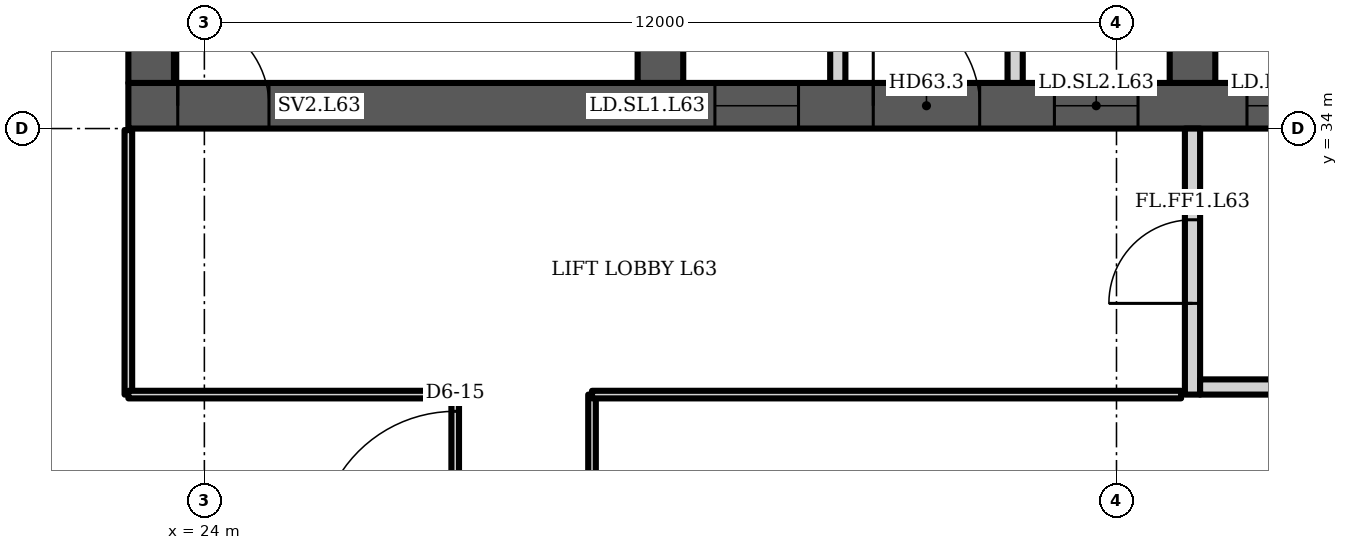
"""IFC4 building model, lengths in metres.
Left out: names, types, materials, properties, quantities, classifications, styles, units other than length and angle.
Written with IfcOpenShell. Run it as: python <this file> out.ifc"""

import sys

from ifc_helpers import new_model, si_unit, direction, frame, frame_2d, origin, place, context, subcontext, project, spatial, polyline, rectangle, outline, extrude, element, fill, save


model = new_model("IFC4")
c1 = context("Model", 3, precision=1e-05, world=origin(), true_north=direction((0.0, 1.0)))
c2 = subcontext(c1, "Body", "Model", "MODEL_VIEW")
j1 = project(units=[si_unit("LENGTHUNIT", "METRE"), si_unit("PLANEANGLEUNIT", "RADIAN")], contexts=[c1])
p1 = place(None, origin())
s1 = spatial("IfcSite", under=j1, at=p1, CompositionType="ELEMENT")
p2 = place(p1, origin())
s2 = spatial("IfcBuilding", under=s1, at=p2, CompositionType="ELEMENT")
p3 = place(p2, frame((0.0, 0.0, 250.3)))
s3 = spatial("IfcBuildingStorey", under=s2, at=p3, CompositionType="ELEMENT", Elevation=250.3)
p4 = place(p3, frame((23.0, 34.3, 0.0), z_axis=(0.0, 0.0, 1.0), x_axis=(1.0, 0.0, 0.0)))
e1 = element("IfcWall", 1, at=p4, inside=s3, PredefinedType="SHEAR", context=c2, shape_type="SweptSolid", body=[
    extrude(rectangle(XDim=35.0, YDim=0.6, at=frame_2d((17.5, 0.0))), origin(), (0.0, 0.0, 1.0), 3.6),
])
p5 = place(p4, frame((0.65, 0.0, 0.0)))
e2 = element("IfcOpeningElement", 2, at=p5, cuts=e1, PredefinedType="OPENING", context=c2, shape_type="SweptSolid", body=[
    extrude(rectangle(XDim=1.2, YDim=2.1, at=frame_2d((0.6, 1.05))), frame((0.0, 0.31, 0.0), z_axis=(0.0, -1.0, 0.0), x_axis=(1.0, 0.0, 0.0)), (0.0, 0.0, 1.0), 0.62),
])
p6 = place(p4, frame((7.717, 0.0, 0.0)))
e3 = element("IfcOpeningElement", 3, at=p6, cuts=e1, PredefinedType="OPENING", context=c2, shape_type="SweptSolid", body=[
    extrude(rectangle(XDim=1.1, YDim=2.1, at=frame_2d((0.55, 1.05))), frame((0.0, 0.31, 0.0), z_axis=(0.0, -1.0, 0.0), x_axis=(1.0, 0.0, 0.0)), (0.0, 0.0, 1.0), 0.62),
])
p7 = place(p4, frame((12.183, 0.0, 0.0)))
e4 = element("IfcOpeningElement", 4, at=p7, cuts=e1, PredefinedType="OPENING", context=c2, shape_type="SweptSolid", body=[
    extrude(rectangle(XDim=1.1, YDim=2.1, at=frame_2d((0.55, 1.05))), frame((0.0, 0.31, 0.0), z_axis=(0.0, -1.0, 0.0), x_axis=(1.0, 0.0, 0.0)), (0.0, 0.0, 1.0), 0.62),
])
p8 = place(p4, frame((9.8, 0.0, 0.0)))
e5 = element("IfcOpeningElement", 5, at=p8, cuts=e1, PredefinedType="OPENING", context=c2, shape_type="SweptSolid", body=[
    extrude(rectangle(XDim=1.4, YDim=2.1, at=frame_2d((0.7, 1.05))), frame((0.0, 0.31, 0.0), z_axis=(0.0, -1.0, 0.0), x_axis=(1.0, 0.0, 0.0)), (0.0, 0.0, 1.0), 0.62),
])
p9 = place(p4, frame((14.717, 0.0, 0.0)))
e6 = element("IfcOpeningElement", 6, at=p9, cuts=e1, PredefinedType="OPENING", context=c2, shape_type="SweptSolid", body=[
    extrude(rectangle(XDim=1.1, YDim=2.1, at=frame_2d((0.55, 1.05))), frame((0.0, 0.31, 0.0), z_axis=(0.0, -1.0, 0.0), x_axis=(1.0, 0.0, 0.0)), (0.0, 0.0, 1.0), 0.62),
])
p10 = place(p4, frame((16.95, 0.0, 0.0)))
e7 = element("IfcOpeningElement", 7, at=p10, cuts=e1, PredefinedType="OPENING", context=c2, shape_type="SweptSolid", body=[
    extrude(rectangle(XDim=1.1, YDim=2.1, at=frame_2d((0.55, 1.05))), frame((0.0, 0.31, 0.0), z_axis=(0.0, -1.0, 0.0), x_axis=(1.0, 0.0, 0.0)), (0.0, 0.0, 1.0), 0.62),
])
p11 = place(p4, frame((19.183, 0.0, 0.0)))
e8 = element("IfcOpeningElement", 8, at=p11, cuts=e1, PredefinedType="OPENING", context=c2, shape_type="SweptSolid", body=[
    extrude(rectangle(XDim=1.1, YDim=2.1, at=frame_2d((0.55, 1.05))), frame((0.0, 0.31, 0.0), z_axis=(0.0, -1.0, 0.0), x_axis=(1.0, 0.0, 0.0)), (0.0, 0.0, 1.0), 0.62),
])
p12 = place(p4, frame((26.15, 0.0, 0.0)))
e9 = element("IfcOpeningElement", 9, at=p12, cuts=e1, PredefinedType="OPENING", context=c2, shape_type="SweptSolid", body=[
    extrude(rectangle(XDim=1.2, YDim=2.1, at=frame_2d((0.6, 1.05))), frame((0.0, 0.31, 0.0), z_axis=(0.0, -1.0, 0.0), x_axis=(1.0, 0.0, 0.0)), (0.0, 0.0, 1.0), 0.62),
])
p13 = place(p4, frame((28.767, 0.0, 0.0)))
e10 = element("IfcOpeningElement", 10, at=p13, cuts=e1, PredefinedType="OPENING", context=c2, shape_type="SweptSolid", body=[
    extrude(rectangle(XDim=1.0, YDim=2.1, at=frame_2d((0.5, 1.05))), frame((0.0, 0.31, 0.0), z_axis=(0.0, -1.0, 0.0), x_axis=(1.0, 0.0, 0.0)), (0.0, 0.0, 1.0), 0.62),
])
p14 = place(p4, frame((33.083, 0.0, 0.0)))
e11 = element("IfcOpeningElement", 11, at=p14, cuts=e1, PredefinedType="OPENING", context=c2, shape_type="SweptSolid", body=[
    extrude(rectangle(XDim=1.0, YDim=2.1, at=frame_2d((0.5, 1.05))), frame((0.0, 0.31, 0.0), z_axis=(0.0, -1.0, 0.0), x_axis=(1.0, 0.0, 0.0)), (0.0, 0.0, 1.0), 0.62),
])
p15 = place(p4, frame((30.8, 0.0, 0.0)))
e12 = element("IfcOpeningElement", 12, at=p15, cuts=e1, PredefinedType="OPENING", context=c2, shape_type="SweptSolid", body=[
    extrude(rectangle(XDim=1.4, YDim=2.1, at=frame_2d((0.7, 1.05))), frame((0.0, 0.31, 0.0), z_axis=(0.0, -1.0, 0.0), x_axis=(1.0, 0.0, 0.0)), (0.0, 0.0, 1.0), 0.62),
])
p16 = place(p3, frame((23.3, 34.6, 0.0), z_axis=(0.0, 0.0, 1.0), x_axis=(0.0, 1.0, 0.0)))
e13 = element("IfcWall", 13, at=p16, inside=s3, PredefinedType="SHEAR", context=c2, shape_type="SweptSolid", body=[
    extrude(rectangle(XDim=13.585, YDim=0.6, at=frame_2d((6.792, 0.0))), origin(), (0.0, 0.0, 1.0), 3.6),
])
p17 = place(p3, frame((30.0, 34.6, 0.0), z_axis=(0.0, 0.0, 1.0), x_axis=(0.0, 1.0, 0.0)))
e14 = element("IfcWall", 14, at=p17, inside=s3, PredefinedType="SHEAR", context=c2, shape_type="SweptSolid", body=[
    extrude(rectangle(XDim=14.171, YDim=0.6, at=frame_2d((7.085, 0.0))), origin(), (0.0, 0.0, 1.0), 3.6),
])
p18 = place(p17, frame((3.8, 0.0, 0.0)))
e15 = element("IfcOpeningElement", 15, at=p18, cuts=e14, PredefinedType="OPENING", context=c2, shape_type="SweptSolid", body=[
    extrude(rectangle(XDim=1.1, YDim=2.1, at=frame_2d((0.55, 1.05))), frame((0.0, 0.31, 0.0), z_axis=(0.0, -1.0, 0.0), x_axis=(1.0, 0.0, 0.0)), (0.0, 0.0, 1.0), 0.62),
])
p19 = place(p3, frame((37.0, 34.6, 0.0), z_axis=(0.0, 0.0, 1.0), x_axis=(0.0, 1.0, 0.0)))
e16 = element("IfcWall", 16, at=p19, inside=s3, PredefinedType="SHEAR", context=c2, shape_type="SweptSolid", body=[
    extrude(rectangle(XDim=14.784, YDim=0.6, at=frame_2d((7.392, 0.0))), origin(), (0.0, 0.0, 1.0), 3.6),
])
p20 = place(p19, frame((11.302, 0.0, 0.0)))
e17 = element("IfcOpeningElement", 17, at=p20, cuts=e16, PredefinedType="OPENING", context=c2, shape_type="SweptSolid", body=[
    extrude(rectangle(XDim=1.0, YDim=2.1, at=frame_2d((0.5, 1.05))), frame((0.0, 0.31, 0.0), z_axis=(0.0, -1.0, 0.0), x_axis=(1.0, 0.0, 0.0)), (0.0, 0.0, 1.0), 0.62),
])
p21 = place(p19, frame((3.8, 0.0, 0.0)))
e18 = element("IfcOpeningElement", 18, at=p21, cuts=e16, PredefinedType="OPENING", context=c2, shape_type="SweptSolid", body=[
    extrude(rectangle(XDim=1.1, YDim=2.1, at=frame_2d((0.55, 1.05))), frame((0.0, 0.31, 0.0), z_axis=(0.0, -1.0, 0.0), x_axis=(1.0, 0.0, 0.0)), (0.0, 0.0, 1.0), 0.62),
])
p22 = place(p3, frame((0.0, 0.0, -0.0)))
e19 = element("IfcWall", 19, at=p22, inside=s3, PredefinedType="PARTITIONING", context=c2, shape_type="SweptSolid", body=[
    extrude(outline(polyline([(32.233, 37.45), (30.3, 37.45), (30.3, 37.65), (32.233, 37.65), (32.433, 37.65), (32.433, 34.6), (32.233, 34.6), (32.233, 37.45)])), origin(), (0.0, 0.0, 1.0), 3.2),
])
p23 = place(p3, frame((0.0, 0.0, -0.0)))
e20 = element("IfcWall", 20, at=p23, inside=s3, PredefinedType="PARTITIONING", context=c2, shape_type="SweptSolid", body=[
    extrude(outline(polyline([(34.567, 37.65), (34.767, 37.65), (36.7, 37.65), (36.7, 37.45), (34.767, 37.45), (34.767, 34.6), (34.567, 34.6), (34.567, 37.65)])), origin(), (0.0, 0.0, 1.0), 3.2),
])
p24 = place(p3, frame((0.0, 0.0, -0.0)))
e21 = element("IfcWall", 21, at=p24, inside=s3, PredefinedType="PARTITIONING", context=c2, shape_type="SweptSolid", body=[
    extrude(outline(polyline([(41.567, 37.1), (39.433, 37.1), (39.433, 34.6), (39.233, 34.6), (39.233, 37.45), (37.3, 37.45), (37.3, 37.65), (39.233, 37.65), (39.433, 37.65), (39.433, 37.3), (41.567, 37.3), (41.567, 37.35), (41.767, 37.35), (43.7, 37.35), (43.7, 37.15), (41.767, 37.15), (41.767, 34.6), (41.567, 34.6), (41.567, 37.1)])), origin(), (0.0, 0.0, 1.0), 3.2),
])
p25 = place(p3, frame((37.0, 30.5, 0.0), z_axis=(0.0, 0.0, 1.0), x_axis=(0.0, 1.0, 0.0)))
e22 = element("IfcWall", 22, at=p25, inside=s3, PredefinedType="PARTITIONING", context=c2, shape_type="SweptSolid", body=[
    extrude(rectangle(XDim=3.5, YDim=0.2, at=frame_2d((1.75, 0.0))), origin(), (0.0, 0.0, 1.0), 3.2),
])
p26 = place(p25, frame((1.2, 0.0, 0.0)))
e23 = element("IfcOpeningElement", 23, at=p26, cuts=e22, PredefinedType="OPENING", context=c2, shape_type="SweptSolid", body=[
    extrude(rectangle(XDim=1.1, YDim=2.1, at=frame_2d((0.55, 1.05))), frame((0.0, 0.11, 0.0), z_axis=(0.0, -1.0, 0.0), x_axis=(1.0, 0.0, 0.0)), (0.0, 0.0, 1.0), 0.22),
])
p27 = place(p3, frame((37.1, 30.6, 0.0), z_axis=(0.0, 0.0, 1.0), x_axis=(1.0, 0.0, 0.0)))
e24 = element("IfcWall", 24, at=p27, inside=s3, PredefinedType="PARTITIONING", context=c2, shape_type="SweptSolid", body=[
    extrude(rectangle(XDim=2.8, YDim=0.2, at=frame_2d((1.4, 0.0))), origin(), (0.0, 0.0, 1.0), 3.2),
])
p28 = place(p3, frame((23.0, 30.5, 0.0), z_axis=(0.0, 0.0, 1.0), x_axis=(0.0, 1.0, 0.0)))
e25 = element("IfcWall", 25, at=p28, inside=s3, PredefinedType="PARTITIONING", context=c2, shape_type="SweptSolid", body=[
    extrude(rectangle(XDim=3.48, YDim=0.1, at=frame_2d((1.74, 0.0))), origin(), (0.0, 0.0, 1.0), 3.2),
])
p29 = place(p3, frame((23.0, 30.5, 0.0), z_axis=(0.0, 0.0, 1.0), x_axis=(1.0, 0.0, 0.0)))
e26 = element("IfcWall", 26, at=p29, inside=s3, PredefinedType="PARTITIONING", context=c2, shape_type="SweptSolid", body=[
    extrude(rectangle(XDim=4.3, YDim=0.1, at=frame_2d((2.15, 0.0))), origin(), (0.0, 0.0, 1.0), 3.2),
])
p30 = place(p3, frame((27.3, 23.25, 0.0), z_axis=(0.0, 0.0, 1.0), x_axis=(0.0, 1.0, 0.0)))
e27 = element("IfcWall", 27, at=p30, inside=s3, PredefinedType="PARTITIONING", context=c2, shape_type="SweptSolid", body=[
    extrude(rectangle(XDim=7.25, YDim=0.1, at=frame_2d((3.625, 0.0))), origin(), (0.0, 0.0, 1.0), 3.2),
])
p31 = place(p30, frame((5.23, 0.0, 0.0)))
e28 = element("IfcOpeningElement", 28, at=p31, cuts=e27, PredefinedType="OPENING", context=c2, shape_type="SweptSolid", body=[
    extrude(rectangle(XDim=1.8, YDim=2.1, at=frame_2d((0.9, 1.05))), frame((0.0, 0.06, 0.0), z_axis=(0.0, -1.0, 0.0), x_axis=(1.0, 0.0, 0.0)), (0.0, 0.0, 1.0), 0.12),
])
p32 = place(p3, frame((29.1, 5.725, 0.0), z_axis=(0.0, 0.0, 1.0), x_axis=(0.0, 1.0, 0.0)))
e29 = element("IfcWall", 29, at=p32, inside=s3, PredefinedType="PARTITIONING", context=c2, shape_type="SweptSolid", body=[
    extrude(rectangle(XDim=24.775, YDim=0.1, at=frame_2d((12.387, 0.0))), origin(), (0.0, 0.0, 1.0), 3.2),
])
p33 = place(p32, frame((5.22, 0.0, 0.0)))
e30 = element("IfcOpeningElement", 30, at=p33, cuts=e29, PredefinedType="OPENING", context=c2, shape_type="SweptSolid", body=[
    extrude(rectangle(XDim=1.0, YDim=2.1, at=frame_2d((0.5, 1.05))), frame((0.0, 0.06, 0.0), z_axis=(0.0, -1.0, 0.0), x_axis=(1.0, 0.0, 0.0)), (0.0, 0.0, 1.0), 0.12),
])
p34 = place(p32, frame((17.095, 0.0, 0.0)))
e31 = element("IfcOpeningElement", 31, at=p34, cuts=e29, PredefinedType="OPENING", context=c2, shape_type="SweptSolid", body=[
    extrude(rectangle(XDim=1.8, YDim=2.1, at=frame_2d((0.9, 1.05))), frame((0.0, 0.06, 0.0), z_axis=(0.0, -1.0, 0.0), x_axis=(1.0, 0.0, 0.0)), (0.0, 0.0, 1.0), 0.12),
])
p35 = place(p3, frame((29.1, 30.5, 0.0), z_axis=(0.0, 0.0, 1.0), x_axis=(1.0, 0.0, 0.0)))
e32 = element("IfcWall", 32, at=p35, inside=s3, PredefinedType="PARTITIONING", context=c2, shape_type="SweptSolid", body=[
    extrude(rectangle(XDim=7.75, YDim=0.1, at=frame_2d((3.875, 0.0))), origin(), (0.0, 0.0, 1.0), 3.2),
])
p36 = place(p5, origin())
e33 = element("IfcDoor", 33, at=p36, inside=s3, OperationType="SINGLE_SWING_LEFT", PredefinedType="DOOR", context=c2, shape_type="SweptSolid", body=[
    extrude(rectangle(XDim=1.2, YDim=2.1, at=frame_2d((0.6, 1.05))), frame((0.0, 0.025, 0.0), z_axis=(0.0, -1.0, 0.0), x_axis=(1.0, 0.0, 0.0)), (0.0, 0.0, 1.0), 0.05),
])
fill(e2, e33)
p37 = place(p6, origin())
e34 = element("IfcDoor", 34, at=p37, inside=s3, OperationType="DOUBLE_DOOR_SLIDING", PredefinedType="DOOR", context=c2, shape_type="SweptSolid", body=[
    extrude(rectangle(XDim=1.1, YDim=2.1, at=frame_2d((0.55, 1.05))), frame((0.0, 0.025, 0.0), z_axis=(0.0, -1.0, 0.0), x_axis=(1.0, 0.0, 0.0)), (0.0, 0.0, 1.0), 0.05),
])
fill(e3, e34)
p38 = place(p7, origin())
e35 = element("IfcDoor", 35, at=p38, inside=s3, OperationType="DOUBLE_DOOR_SLIDING", PredefinedType="DOOR", context=c2, shape_type="SweptSolid", body=[
    extrude(rectangle(XDim=1.1, YDim=2.1, at=frame_2d((0.55, 1.05))), frame((0.0, 0.025, 0.0), z_axis=(0.0, -1.0, 0.0), x_axis=(1.0, 0.0, 0.0)), (0.0, 0.0, 1.0), 0.05),
])
fill(e4, e35)
p39 = place(p8, origin())
e36 = element("IfcDoor", 36, at=p39, inside=s3, OperationType="DOUBLE_DOOR_SINGLE_SWING", PredefinedType="DOOR", context=c2, shape_type="SweptSolid", body=[
    extrude(rectangle(XDim=1.4, YDim=2.1, at=frame_2d((0.7, 1.05))), frame((0.0, 0.025, 0.0), z_axis=(0.0, -1.0, 0.0), x_axis=(1.0, 0.0, 0.0)), (0.0, 0.0, 1.0), 0.05),
])
fill(e5, e36)
p40 = place(p9, origin())
e37 = element("IfcDoor", 37, at=p40, inside=s3, OperationType="DOUBLE_DOOR_SLIDING", PredefinedType="DOOR", context=c2, shape_type="SweptSolid", body=[
    extrude(rectangle(XDim=1.1, YDim=2.1, at=frame_2d((0.55, 1.05))), frame((0.0, 0.025, 0.0), z_axis=(0.0, -1.0, 0.0), x_axis=(1.0, 0.0, 0.0)), (0.0, 0.0, 1.0), 0.05),
])
fill(e6, e37)
p41 = place(p26, origin())
e38 = element("IfcDoor", 38, at=p41, inside=s3, OperationType="SINGLE_SWING_LEFT", PredefinedType="DOOR", context=c2, shape_type="SweptSolid", body=[
    extrude(rectangle(XDim=1.1, YDim=2.1, at=frame_2d((0.55, 1.05))), frame((0.0, 0.025, 0.0), z_axis=(0.0, -1.0, 0.0), x_axis=(1.0, 0.0, 0.0)), (0.0, 0.0, 1.0), 0.05),
])
fill(e23, e38)
p42 = place(p31, origin())
e39 = element("IfcDoor", 39, at=p42, inside=s3, OperationType="DOUBLE_DOOR_SINGLE_SWING", PredefinedType="DOOR", context=c2, shape_type="SweptSolid", body=[
    extrude(rectangle(XDim=1.8, YDim=2.1, at=frame_2d((0.9, 1.05))), frame((0.0, 0.025, 0.0), z_axis=(0.0, -1.0, 0.0), x_axis=(1.0, 0.0, 0.0)), (0.0, 0.0, 1.0), 0.05),
])
fill(e28, e39)
save(model, sys.argv[1])
